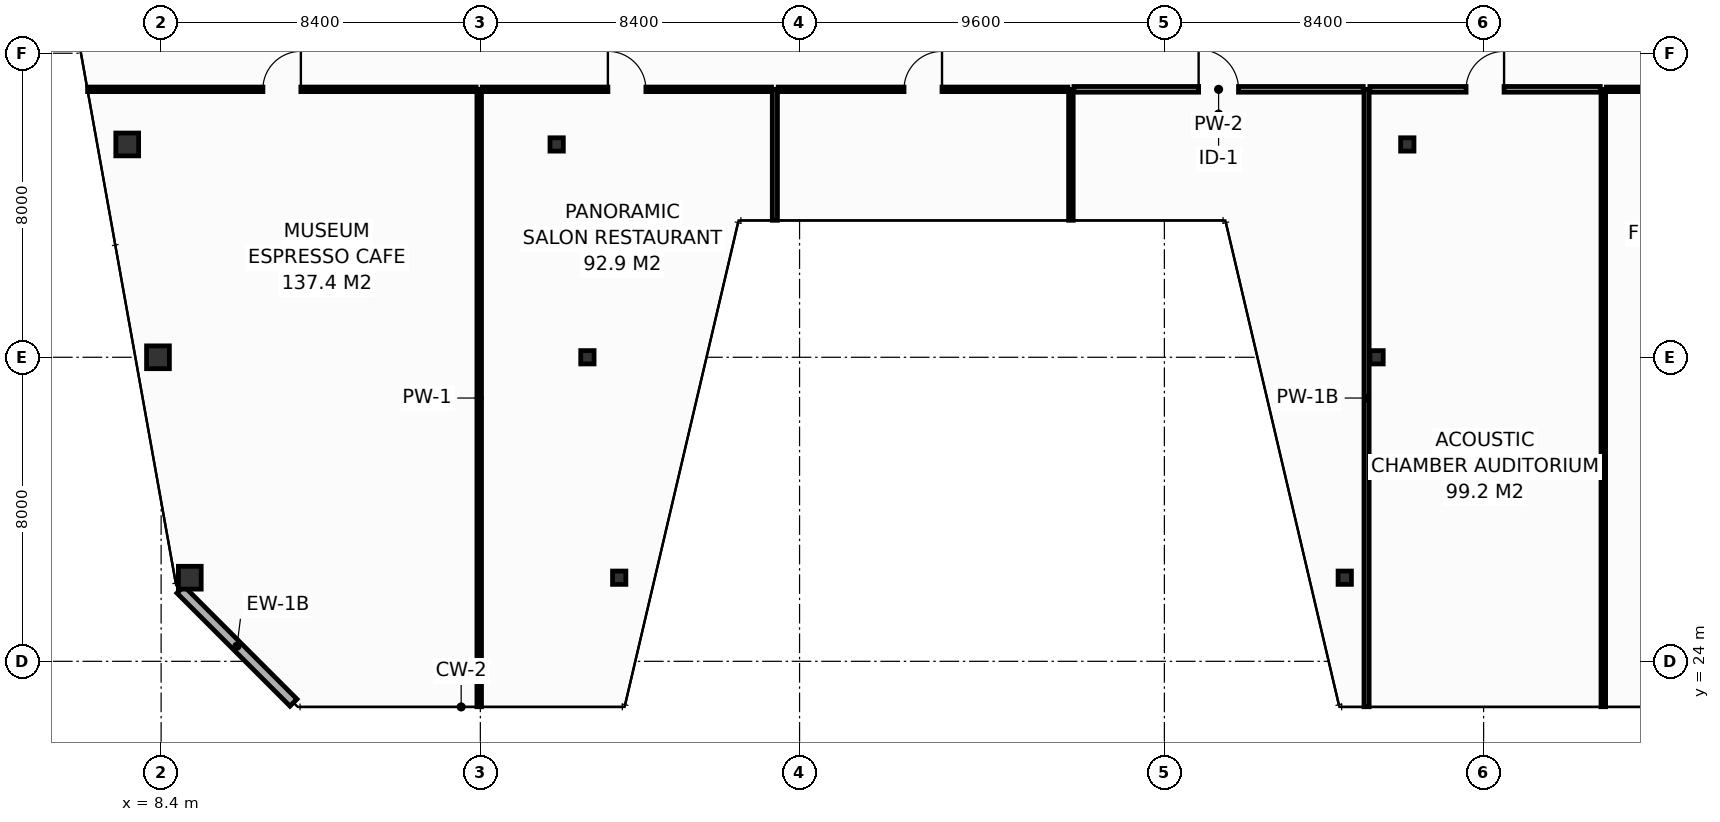
"""IFC4 building model, lengths in metres.
Left out: names, types, materials, properties, quantities, classifications, styles, units other than length and angle.
Written with IfcOpenShell. Run it as: python <this file> out.ifc"""

import sys

from ifc_helpers import new_model, si_unit, direction, frame, frame_2d, origin, origin_2d, place, context, subcontext, project, spatial, rectangle, hollow_rectangle, extrude, element, fill, save


model = new_model("IFC4")
c1 = context("Model", 3, precision=1e-05, world=origin(), true_north=direction((0.0, 1.0)))
c2 = subcontext(c1, "Body", "Model", "MODEL_VIEW")
j1 = project(units=[si_unit("LENGTHUNIT", "METRE"), si_unit("PLANEANGLEUNIT", "RADIAN")], contexts=[c1])
p1 = place(None, origin())
s1 = spatial("IfcSite", under=j1, at=p1, CompositionType="ELEMENT")
p2 = place(p1, origin())
s2 = spatial("IfcBuilding", under=s1, at=p2, CompositionType="ELEMENT")
p3 = place(p2, frame((0.0, 0.0, 261.0)))
s3 = spatial("IfcBuildingStorey", under=s2, at=p3, CompositionType="ELEMENT", Elevation=261.0)
p4 = place(p3, frame((9.154, 26.2, 0.0), z_axis=(0.0, 0.0, 1.0), x_axis=(1.0, 0.0, 0.0)))
e1 = element("IfcColumn", 1, at=p4, inside=s3, PredefinedType="COLUMN", context=c2, shape_type="SweptSolid", body=[
    extrude(hollow_rectangle(XDim=0.6, YDim=0.6, WallThickness=0.028, at=origin_2d()), origin(), (0.0, 0.0, 1.0), 3.8),
])
for number, where, z_axis, x_axis in (
    (2, (20.454, 26.2, 0.0), (0.0, 0.0, 1.0), (1.0, 0.0, 0.0)),
    (3, (39.546, 26.2, 0.0), (0.0, 0.0, 1.0), (1.0, 0.0, 0.0)),
):
    element("IfcColumn", number, at=place(p3, frame(where, z_axis=z_axis, x_axis=x_axis)), inside=s3, PredefinedType="COLUMN", context=c2, shape_type="SweptSolid", body=[
        extrude(hollow_rectangle(XDim=0.35, YDim=0.35, WallThickness=0.016, at=origin_2d()), origin(), (0.0, 0.0, 1.0), 3.8),
    ])
p5 = place(p3, frame((8.317, 32.0, 0.0), z_axis=(0.0, 0.0, 1.0), x_axis=(1.0, 0.0, 0.0)))
e4 = element("IfcColumn", 4, at=p5, inside=s3, PredefinedType="COLUMN", context=c2, shape_type="SweptSolid", body=[
    extrude(hollow_rectangle(XDim=0.6, YDim=0.6, WallThickness=0.028, at=origin_2d()), origin(), (0.0, 0.0, 1.0), 3.8),
])
for number, where, z_axis, x_axis in (
    (5, (19.617, 32.0, 0.0), (0.0, 0.0, 1.0), (1.0, 0.0, 0.0)),
    (6, (40.383, 32.0, 0.0), (0.0, 0.0, 1.0), (1.0, 0.0, 0.0)),
):
    element("IfcColumn", number, at=place(p3, frame(where, z_axis=z_axis, x_axis=x_axis)), inside=s3, PredefinedType="COLUMN", context=c2, shape_type="SweptSolid", body=[
        extrude(hollow_rectangle(XDim=0.35, YDim=0.35, WallThickness=0.016, at=origin_2d()), origin(), (0.0, 0.0, 1.0), 3.8),
    ])
p6 = place(p3, frame((7.508, 37.6, 0.0), z_axis=(0.0, 0.0, 1.0), x_axis=(1.0, 0.0, 0.0)))
e7 = element("IfcColumn", 7, at=p6, inside=s3, PredefinedType="COLUMN", context=c2, shape_type="SweptSolid", body=[
    extrude(hollow_rectangle(XDim=0.6, YDim=0.6, WallThickness=0.028, at=origin_2d()), origin(), (0.0, 0.0, 1.0), 3.8),
])
for number, where, z_axis, x_axis in (
    (8, (18.808, 37.6, 0.0), (0.0, 0.0, 1.0), (1.0, 0.0, 0.0)),
    (9, (41.192, 37.6, 0.0), (0.0, 0.0, 1.0), (1.0, 0.0, 0.0)),
):
    element("IfcColumn", number, at=place(p3, frame(where, z_axis=z_axis, x_axis=x_axis)), inside=s3, PredefinedType="COLUMN", context=c2, shape_type="SweptSolid", body=[
        extrude(hollow_rectangle(XDim=0.35, YDim=0.35, WallThickness=0.016, at=origin_2d()), origin(), (0.0, 0.0, 1.0), 3.8),
    ])
p7 = place(p3, frame((8.909, 25.887, 0.0), z_axis=(0.0, 0.0, 1.0), x_axis=(0.707106781187, -0.707106781187, 0.0)))
e10 = element("IfcWall", 10, at=p7, inside=s3, PredefinedType="STANDARD", context=c2, shape_type="SweptSolid", body=[
    extrude(rectangle(XDim=4.206, YDim=0.26, at=frame_2d((2.103, 0.0))), origin(), (0.0, 0.0, 1.0), 3.55),
])
p8 = place(p3, frame((16.77, 22.805, 0.0), z_axis=(0.0, 0.0, 1.0), x_axis=(0.0, 1.0, 0.0)))
e11 = element("IfcWall", 11, at=p8, inside=s3, PredefinedType="PARTITIONING", context=c2, shape_type="SweptSolid", body=[
    extrude(rectangle(XDim=16.245, YDim=0.12, at=frame_2d((8.123, 0.0))), origin(), (0.0, 0.0, 1.0), 2.947),
])
p9 = place(p3, frame((24.55, 35.605, 0.0), z_axis=(0.0, 0.0, 1.0), x_axis=(0.0, 1.0, 0.0)))
e12 = element("IfcWall", 12, at=p9, inside=s3, PredefinedType="PARTITIONING", context=c2, shape_type="SweptSolid", body=[
    extrude(rectangle(XDim=3.445, YDim=0.135, at=frame_2d((1.723, 0.0))), origin(), (0.0, 0.0, 1.0), 3.55),
])
p10 = place(p3, frame((32.34, 35.605, 0.0), z_axis=(0.0, 0.0, 1.0), x_axis=(0.0, 1.0, 0.0)))
e13 = element("IfcWall", 13, at=p10, inside=s3, PredefinedType="PARTITIONING", context=c2, shape_type="SweptSolid", body=[
    extrude(rectangle(XDim=3.445, YDim=0.12, at=frame_2d((1.723, 0.0))), origin(), (0.0, 0.0, 1.0), 3.55),
])
p11 = place(p3, frame((40.12, 22.805, 0.0), z_axis=(0.0, 0.0, 1.0), x_axis=(0.0, 1.0, 0.0)))
e14 = element("IfcWall", 14, at=p11, inside=s3, PredefinedType="PARTITIONING", context=c2, shape_type="SweptSolid", body=[
    extrude(rectangle(XDim=16.245, YDim=0.135, at=frame_2d((8.123, 0.0))), origin(), (0.0, 0.0, 1.0), 2.947),
])
p12 = place(p3, frame((46.35, 22.805, 0.0), z_axis=(0.0, 0.0, 1.0), x_axis=(0.0, 1.0, 0.0)))
e15 = element("IfcWall", 15, at=p12, inside=s3, PredefinedType="PARTITIONING", context=c2, shape_type="SweptSolid", body=[
    extrude(rectangle(XDim=16.245, YDim=0.12, at=frame_2d((8.123, 0.0))), origin(), (0.0, 0.0, 1.0), 2.947),
])
p13 = place(p3, frame((6.466, 39.05, 0.0), z_axis=(0.0, 0.0, 1.0), x_axis=(1.0, 0.0, 0.0)))
e16 = element("IfcWall", 16, at=p13, inside=s3, PredefinedType="PARTITIONING", context=c2, shape_type="SweptSolid", body=[
    extrude(rectangle(XDim=10.224, YDim=0.12, at=frame_2d((5.112, 0.0))), origin(), (0.0, 0.0, 1.0), 3.085),
])
p14 = place(p13, frame((4.612, 0.0, 0.0)))
e17 = element("IfcOpeningElement", 17, at=p14, cuts=e16, PredefinedType="OPENING", context=c2, shape_type="SweptSolid", body=[
    extrude(rectangle(XDim=1.0, YDim=2.15, at=frame_2d((0.5, 1.075))), frame((0.0, 0.07, 0.0), z_axis=(0.0, -1.0, 0.0), x_axis=(1.0, 0.0, 0.0)), (0.0, 0.0, 1.0), 0.14),
])
p15 = place(p3, frame((16.85, 39.05, 0.0), z_axis=(0.0, 0.0, 1.0), x_axis=(1.0, 0.0, 0.0)))
e18 = element("IfcWall", 18, at=p15, inside=s3, PredefinedType="PARTITIONING", context=c2, shape_type="SweptSolid", body=[
    extrude(rectangle(XDim=7.612, YDim=0.12, at=frame_2d((3.806, 0.0))), origin(), (0.0, 0.0, 1.0), 2.947),
])
p16 = place(p15, frame((3.306, 0.0, 0.0)))
e19 = element("IfcOpeningElement", 19, at=p16, cuts=e18, PredefinedType="OPENING", context=c2, shape_type="SweptSolid", body=[
    extrude(rectangle(XDim=1.0, YDim=2.15, at=frame_2d((0.5, 1.075))), frame((0.0, 0.07, 0.0), z_axis=(0.0, -1.0, 0.0), x_axis=(1.0, 0.0, 0.0)), (0.0, 0.0, 1.0), 0.14),
])
p17 = place(p3, frame((24.637, 39.05, 0.0), z_axis=(0.0, 0.0, 1.0), x_axis=(1.0, 0.0, 0.0)))
e20 = element("IfcWall", 20, at=p17, inside=s3, PredefinedType="PARTITIONING", context=c2, shape_type="SweptSolid", body=[
    extrude(rectangle(XDim=7.623, YDim=0.12, at=frame_2d((3.811, 0.0))), origin(), (0.0, 0.0, 1.0), 3.55),
])
p18 = place(p17, frame((3.311, 0.0, 0.0)))
e21 = element("IfcOpeningElement", 21, at=p18, cuts=e20, PredefinedType="OPENING", context=c2, shape_type="SweptSolid", body=[
    extrude(rectangle(XDim=1.0, YDim=2.15, at=frame_2d((0.5, 1.075))), frame((0.0, 0.07, 0.0), z_axis=(0.0, -1.0, 0.0), x_axis=(1.0, 0.0, 0.0)), (0.0, 0.0, 1.0), 0.14),
])
p19 = place(p3, frame((32.42, 39.05, 0.0), z_axis=(0.0, 0.0, 1.0), x_axis=(1.0, 0.0, 0.0)))
e22 = element("IfcWall", 22, at=p19, inside=s3, PredefinedType="PARTITIONING", context=c2, shape_type="SweptSolid", body=[
    extrude(rectangle(XDim=7.613, YDim=0.15, at=frame_2d((3.806, 0.0))), origin(), (0.0, 0.0, 1.0), 2.947),
])
p20 = place(p19, frame((3.281, 0.0, 0.0)))
e23 = element("IfcOpeningElement", 23, at=p20, cuts=e22, PredefinedType="OPENING", context=c2, shape_type="SweptSolid", body=[
    extrude(rectangle(XDim=1.05, YDim=2.15, at=frame_2d((0.525, 1.075))), frame((0.0, 0.085, 0.0), z_axis=(0.0, -1.0, 0.0), x_axis=(1.0, 0.0, 0.0)), (0.0, 0.0, 1.0), 0.17),
])
p21 = place(p3, frame((40.208, 39.05, 0.0), z_axis=(0.0, 0.0, 1.0), x_axis=(1.0, 0.0, 0.0)))
e24 = element("IfcWall", 24, at=p21, inside=s3, PredefinedType="PARTITIONING", context=c2, shape_type="SweptSolid", body=[
    extrude(rectangle(XDim=6.062, YDim=0.15, at=frame_2d((3.031, 0.0))), origin(), (0.0, 0.0, 1.0), 3.55),
])
p22 = place(p21, frame((2.531, 0.0, 0.0)))
e25 = element("IfcOpeningElement", 25, at=p22, cuts=e24, PredefinedType="OPENING", context=c2, shape_type="SweptSolid", body=[
    extrude(rectangle(XDim=1.0, YDim=2.15, at=frame_2d((0.5, 1.075))), frame((0.0, 0.085, 0.0), z_axis=(0.0, -1.0, 0.0), x_axis=(1.0, 0.0, 0.0)), (0.0, 0.0, 1.0), 0.17),
])
p23 = place(p3, frame((46.43, 39.05, 0.0), z_axis=(0.0, 0.0, 1.0), x_axis=(1.0, 0.0, 0.0)))
e26 = element("IfcWall", 26, at=p23, inside=s3, PredefinedType="PARTITIONING", context=c2, shape_type="SweptSolid", body=[
    extrude(rectangle(XDim=7.104, YDim=0.12, at=frame_2d((3.552, 0.0))), origin(), (0.0, 0.0, 1.0), 3.085),
])
p24 = place(p23, frame((3.102, 0.0, 0.0)))
e27 = element("IfcOpeningElement", 27, at=p24, cuts=e26, PredefinedType="OPENING", context=c2, shape_type="SweptSolid", body=[
    extrude(rectangle(XDim=0.9, YDim=2.1, at=frame_2d((0.45, 1.05))), frame((0.0, 0.07, 0.0), z_axis=(0.0, -1.0, 0.0), x_axis=(1.0, 0.0, 0.0)), (0.0, 0.0, 1.0), 0.14),
])
p25 = place(p14, origin())
e28 = element("IfcDoor", 28, at=p25, inside=s3, OperationType="SINGLE_SWING_RIGHT", PredefinedType="DOOR", context=c2, shape_type="SweptSolid", body=[
    extrude(rectangle(XDim=1.0, YDim=2.15, at=frame_2d((0.5, 1.075))), frame((0.0, 0.025, 0.0), z_axis=(0.0, -1.0, 0.0), x_axis=(1.0, 0.0, 0.0)), (0.0, 0.0, 1.0), 0.05),
])
fill(e17, e28)
p26 = place(p16, origin())
e29 = element("IfcDoor", 29, at=p26, inside=s3, OperationType="SINGLE_SWING_LEFT", PredefinedType="DOOR", context=c2, shape_type="SweptSolid", body=[
    extrude(rectangle(XDim=1.0, YDim=2.15, at=frame_2d((0.5, 1.075))), frame((0.0, 0.025, 0.0), z_axis=(0.0, -1.0, 0.0), x_axis=(1.0, 0.0, 0.0)), (0.0, 0.0, 1.0), 0.05),
])
fill(e19, e29)
p27 = place(p18, origin())
e30 = element("IfcDoor", 30, at=p27, inside=s3, OperationType="SINGLE_SWING_RIGHT", PredefinedType="DOOR", context=c2, shape_type="SweptSolid", body=[
    extrude(rectangle(XDim=1.0, YDim=2.15, at=frame_2d((0.5, 1.075))), frame((0.0, 0.025, 0.0), z_axis=(0.0, -1.0, 0.0), x_axis=(1.0, 0.0, 0.0)), (0.0, 0.0, 1.0), 0.05),
])
fill(e21, e30)
p28 = place(p20, origin())
e31 = element("IfcDoor", 31, at=p28, inside=s3, OperationType="SINGLE_SWING_LEFT", PredefinedType="DOOR", context=c2, shape_type="SweptSolid", body=[
    extrude(rectangle(XDim=1.05, YDim=2.15, at=frame_2d((0.525, 1.075))), frame((0.0, 0.025, 0.0), z_axis=(0.0, -1.0, 0.0), x_axis=(1.0, 0.0, 0.0)), (0.0, 0.0, 1.0), 0.05),
])
fill(e23, e31)
p29 = place(p22, origin())
e32 = element("IfcDoor", 32, at=p29, inside=s3, OperationType="SINGLE_SWING_RIGHT", PredefinedType="DOOR", context=c2, shape_type="SweptSolid", body=[
    extrude(rectangle(XDim=1.0, YDim=2.15, at=frame_2d((0.5, 1.075))), frame((0.0, 0.025, 0.0), z_axis=(0.0, -1.0, 0.0), x_axis=(1.0, 0.0, 0.0)), (0.0, 0.0, 1.0), 0.05),
])
fill(e25, e32)
save(model, sys.argv[1])
